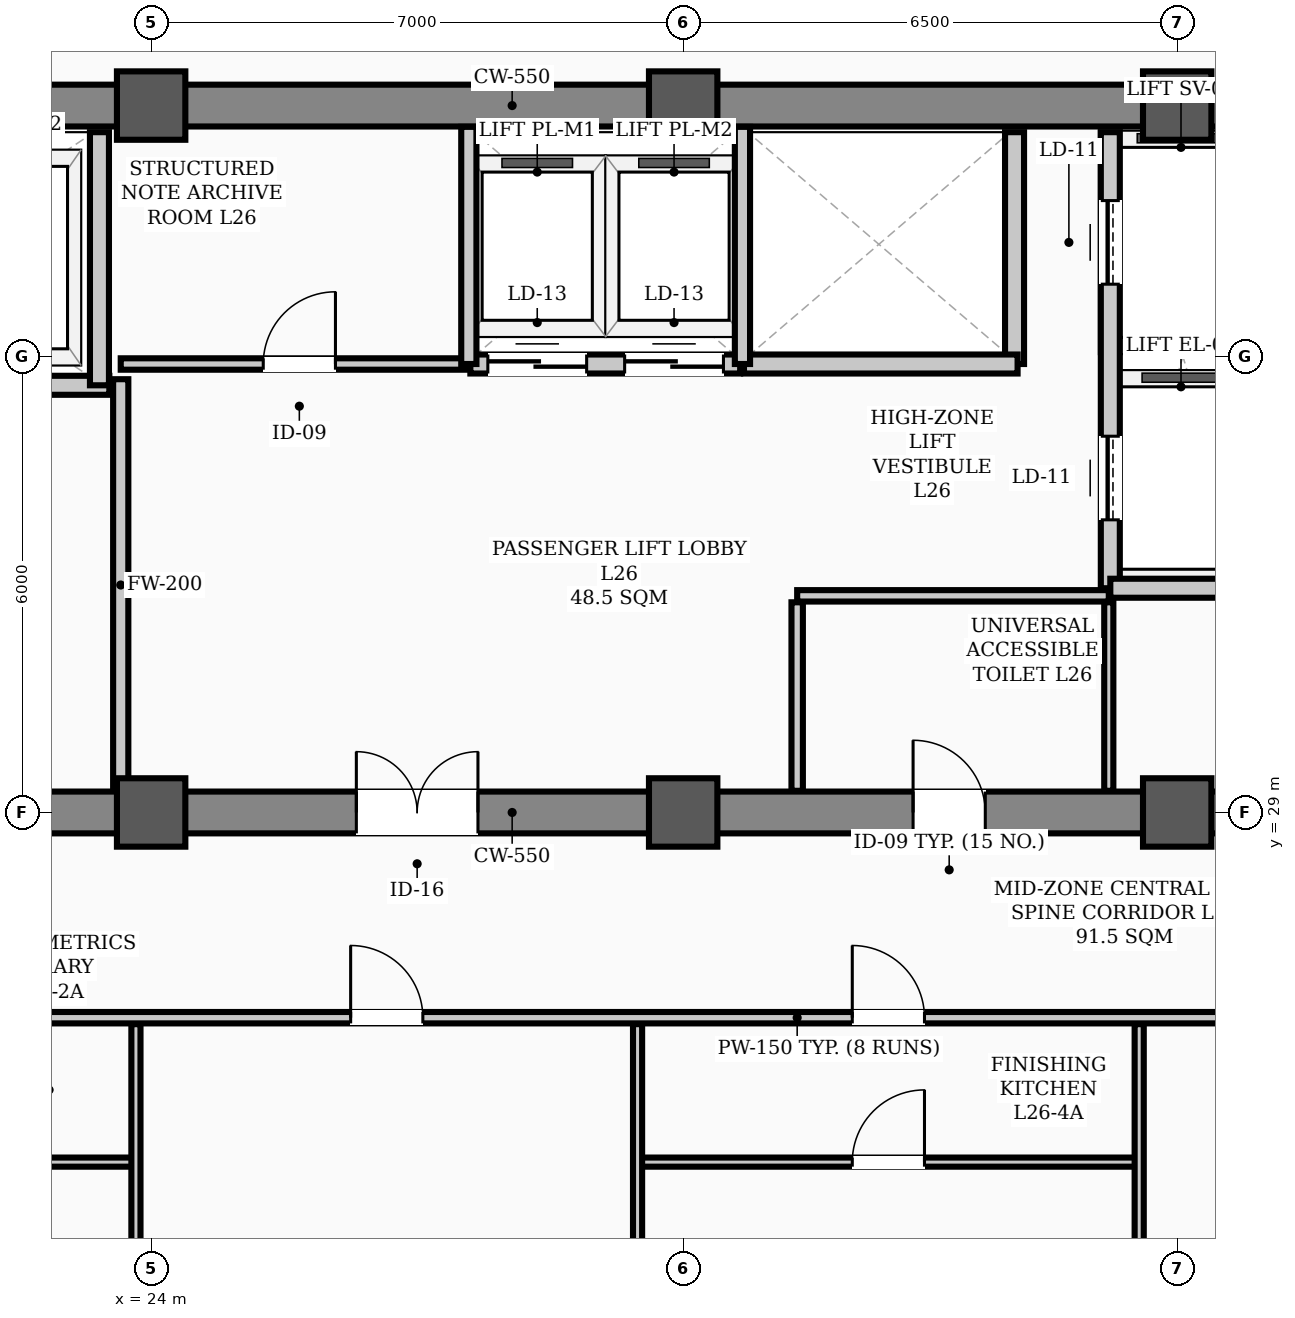
"""IFC4 building model, lengths in metres.
Left out: names, types, materials, properties, quantities, classifications, styles, units other than length and angle.
Written with IfcOpenShell. Run it as: python <this file> out.ifc"""

import sys

from ifc_helpers import new_model, si_unit, direction, frame, frame_2d, origin, origin_2d, place, context, subcontext, project, spatial, rectangle, hollow_rectangle, extrude, element, fill, save


model = new_model("IFC4")
c1 = context("Model", 3, precision=1e-05, world=origin(), true_north=direction((0.0, 1.0)))
c2 = subcontext(c1, "Body", "Model", "MODEL_VIEW")
j1 = project(units=[si_unit("LENGTHUNIT", "METRE"), si_unit("PLANEANGLEUNIT", "RADIAN")], contexts=[c1])
p1 = place(None, origin())
s1 = spatial("IfcSite", under=j1, at=p1, CompositionType="ELEMENT")
p2 = place(p1, origin())
s2 = spatial("IfcBuilding", under=s1, at=p2, CompositionType="ELEMENT")
p3 = place(p2, frame((0.0, 0.0, 106.0)))
s3 = spatial("IfcBuildingStorey", under=s2, at=p3, CompositionType="ELEMENT", Elevation=106.0)
for number, where, z_axis, x_axis in (
    (1, (24.0, 29.0, 0.0), (0.0, 0.0, 1.0), (1.0, 0.0, 0.0)),
    (2, (24.0, 38.3, 0.0), (0.0, 0.0, 1.0), (1.0, 0.0, 0.0)),
    (3, (31.0, 29.0, 0.0), (0.0, 0.0, 1.0), (1.0, 0.0, 0.0)),
    (4, (31.0, 38.3, 0.0), (0.0, 0.0, 1.0), (1.0, 0.0, 0.0)),
    (5, (37.5, 29.0, 0.0), (0.0, 0.0, 1.0), (1.0, 0.0, 0.0)),
    (6, (37.5, 38.3, 0.0), (0.0, 0.0, 1.0), (1.0, 0.0, 0.0)),
):
    element("IfcColumn", number, at=place(p3, frame(where, z_axis=z_axis, x_axis=x_axis)), inside=s3, PredefinedType="COLUMN", context=c2, shape_type="SweptSolid", body=[
        extrude(hollow_rectangle(XDim=0.9, YDim=0.9, WallThickness=0.035, InnerFilletRadius=0.017, OuterFilletRadius=0.052, at=origin_2d()), origin(), (0.0, 0.0, 1.0), 5.0),
    ])
p4 = place(p3, frame((13.5, 29.0, 0.0), z_axis=(0.0, 0.0, 1.0), x_axis=(1.0, 0.0, 0.0)))
e7 = element("IfcWall", 7, at=p4, inside=s3, PredefinedType="SHEAR", context=c2, shape_type="SweptSolid", body=[
    extrude(rectangle(XDim=30.5, YDim=0.55, at=frame_2d((15.25, 0.0))), origin(), (0.0, 0.0, 1.0), 4.82),
])
p5 = place(p4, frame((1.75, 0.0, 0.0)))
e8 = element("IfcOpeningElement", 8, at=p5, cuts=e7, PredefinedType="OPENING", context=c2, shape_type="SweptSolid", body=[
    extrude(rectangle(XDim=1.1, YDim=2.08, at=frame_2d((0.55, 1.04))), frame((0.0, 0.285, 0.0), z_axis=(0.0, -1.0, 0.0), x_axis=(1.0, 0.0, 0.0)), (0.0, 0.0, 1.0), 0.57),
])
p6 = place(p4, frame((26.7, 0.0, 0.0)))
e9 = element("IfcOpeningElement", 9, at=p6, cuts=e7, PredefinedType="OPENING", context=c2, shape_type="SweptSolid", body=[
    extrude(rectangle(XDim=1.1, YDim=2.08, at=frame_2d((0.55, 1.04))), frame((0.0, 0.285, 0.0), z_axis=(0.0, -1.0, 0.0), x_axis=(1.0, 0.0, 0.0)), (0.0, 0.0, 1.0), 0.57),
])
p7 = place(p4, frame((6.8, 0.0, 0.0)))
e10 = element("IfcOpeningElement", 10, at=p7, cuts=e7, PredefinedType="OPENING", context=c2, shape_type="SweptSolid", body=[
    extrude(rectangle(XDim=1.1, YDim=2.08, at=frame_2d((0.55, 1.04))), frame((0.0, 0.285, 0.0), z_axis=(0.0, -1.0, 0.0), x_axis=(1.0, 0.0, 0.0)), (0.0, 0.0, 1.0), 0.57),
])
p8 = place(p4, frame((13.2, 0.0, 0.0)))
e11 = element("IfcOpeningElement", 11, at=p8, cuts=e7, PredefinedType="OPENING", context=c2, shape_type="SweptSolid", body=[
    extrude(rectangle(XDim=1.6, YDim=2.08, at=frame_2d((0.8, 1.04))), frame((0.0, 0.285, 0.0), z_axis=(0.0, -1.0, 0.0), x_axis=(1.0, 0.0, 0.0)), (0.0, 0.0, 1.0), 0.57),
])
p9 = place(p4, frame((20.525, 0.0, 0.0)))
e12 = element("IfcOpeningElement", 12, at=p9, cuts=e7, PredefinedType="OPENING", context=c2, shape_type="SweptSolid", body=[
    extrude(rectangle(XDim=0.95, YDim=2.08, at=frame_2d((0.475, 1.04))), frame((0.0, 0.285, 0.0), z_axis=(0.0, -1.0, 0.0), x_axis=(1.0, 0.0, 0.0)), (0.0, 0.0, 1.0), 0.57),
])
p10 = place(p3, frame((13.5, 38.3, 0.0), z_axis=(0.0, 0.0, 1.0), x_axis=(1.0, 0.0, 0.0)))
e13 = element("IfcWall", 13, at=p10, inside=s3, PredefinedType="SHEAR", context=c2, shape_type="SweptSolid", body=[
    extrude(rectangle(XDim=30.5, YDim=0.55, at=frame_2d((15.25, 0.0))), origin(), (0.0, 0.0, 1.0), 4.82),
])
p11 = place(p3, frame((18.1, 34.62, 0.0), z_axis=(0.0, 0.0, 1.0), x_axis=(1.0, 0.0, 0.0)))
e14 = element("IfcWall", 14, at=p11, inside=s3, PredefinedType="STANDARD", context=c2, shape_type="SweptSolid", body=[
    extrude(rectangle(XDim=5.35, YDim=0.25, at=frame_2d((2.675, 0.0))), origin(), (0.0, 0.0, 1.0), 4.82),
])
p12 = place(p11, frame((0.85, 0.0, 0.0)))
e15 = element("IfcOpeningElement", 15, at=p12, cuts=e14, PredefinedType="OPENING", context=c2, shape_type="SweptSolid", body=[
    extrude(rectangle(XDim=1.1, YDim=2.08, at=frame_2d((0.55, 1.04))), frame((0.0, 0.135, 0.0), z_axis=(0.0, -1.0, 0.0), x_axis=(1.0, 0.0, 0.0)), (0.0, 0.0, 1.0), 0.27),
])
p13 = place(p11, frame((3.45, 0.0, 0.0)))
e16 = element("IfcOpeningElement", 16, at=p13, cuts=e14, PredefinedType="OPENING", context=c2, shape_type="SweptSolid", body=[
    extrude(rectangle(XDim=1.1, YDim=2.08, at=frame_2d((0.55, 1.04))), frame((0.0, 0.135, 0.0), z_axis=(0.0, -1.0, 0.0), x_axis=(1.0, 0.0, 0.0)), (0.0, 0.0, 1.0), 0.27),
])
p14 = place(p3, frame((36.62, 31.95, 0.0), z_axis=(0.0, 0.0, 1.0), x_axis=(0.0, 1.0, 0.0)))
e17 = element("IfcWall", 17, at=p14, inside=s3, PredefinedType="STANDARD", context=c2, shape_type="SweptSolid", body=[
    extrude(rectangle(XDim=6.0, YDim=0.25, at=frame_2d((3.0, 0.0))), origin(), (0.0, 0.0, 1.0), 4.4),
])
p15 = place(p14, frame((0.9, 0.0, 0.0)))
e18 = element("IfcOpeningElement", 18, at=p15, cuts=e17, PredefinedType="OPENING", context=c2, shape_type="SweptSolid", body=[
    extrude(rectangle(XDim=1.1, YDim=2.08, at=frame_2d((0.55, 1.04))), frame((0.0, 0.135, 0.0), z_axis=(0.0, -1.0, 0.0), x_axis=(1.0, 0.0, 0.0)), (0.0, 0.0, 1.0), 0.27),
])
p16 = place(p14, frame((4.0, 0.0, 0.0)))
e19 = element("IfcOpeningElement", 19, at=p16, cuts=e17, PredefinedType="OPENING", context=c2, shape_type="SweptSolid", body=[
    extrude(rectangle(XDim=1.1, YDim=2.08, at=frame_2d((0.55, 1.04))), frame((0.0, 0.135, 0.0), z_axis=(0.0, -1.0, 0.0), x_axis=(1.0, 0.0, 0.0)), (0.0, 0.0, 1.0), 0.27),
])
p17 = place(p3, frame((36.62, 31.95, 0.0), z_axis=(0.0, 0.0, 1.0), x_axis=(1.0, 0.0, 0.0)))
e20 = element("IfcWall", 20, at=p17, inside=s3, PredefinedType="STANDARD", context=c2, shape_type="SweptSolid", body=[
    extrude(rectangle(XDim=1.9, YDim=0.25, at=frame_2d((0.95, 0.0))), origin(), (0.0, 0.0, 1.0), 4.58),
])
p18 = place(p3, frame((23.32, 34.62, 0.0), z_axis=(0.0, 0.0, 1.0), x_axis=(0.0, 1.0, 0.0)))
e21 = element("IfcWall", 21, at=p18, inside=s3, PredefinedType="STANDARD", context=c2, shape_type="SweptSolid", body=[
    extrude(rectangle(XDim=3.33, YDim=0.25, at=frame_2d((1.665, 0.0))), origin(), (0.0, 0.0, 1.0), 4.4),
])
p19 = place(p3, frame((35.36, 34.9, 0.0), z_axis=(0.0, 0.0, 1.0), x_axis=(0.0, 1.0, 0.0)))
e22 = element("IfcWall", 22, at=p19, inside=s3, PredefinedType="STANDARD", context=c2, shape_type="SweptSolid", body=[
    extrude(rectangle(XDim=3.05, YDim=0.25, at=frame_2d((1.525, 0.0))), origin(), (0.0, 0.0, 1.0), 4.4),
])
p20 = place(p3, frame((28.2, 34.9, 0.0), z_axis=(0.0, 0.0, 1.0), x_axis=(1.0, 0.0, 0.0)))
e23 = element("IfcWall", 23, at=p20, inside=s3, PredefinedType="STANDARD", context=c2, shape_type="SweptSolid", body=[
    extrude(rectangle(XDim=3.55, YDim=0.25, at=frame_2d((1.775, 0.0))), origin(), (0.0, 0.0, 1.0), 4.82),
])
p21 = place(p20, frame((0.23, 0.0, 0.0)))
e24 = element("IfcOpeningElement", 24, at=p21, cuts=e23, PredefinedType="OPENING", context=c2, shape_type="SweptSolid", body=[
    extrude(rectangle(XDim=1.3, YDim=2.08, at=frame_2d((0.65, 1.04))), frame((0.0, 0.135, 0.0), z_axis=(0.0, -1.0, 0.0), x_axis=(1.0, 0.0, 0.0)), (0.0, 0.0, 1.0), 0.27),
])
p22 = place(p20, frame((2.03, 0.0, 0.0)))
e25 = element("IfcOpeningElement", 25, at=p22, cuts=e23, PredefinedType="OPENING", context=c2, shape_type="SweptSolid", body=[
    extrude(rectangle(XDim=1.3, YDim=2.08, at=frame_2d((0.65, 1.04))), frame((0.0, 0.135, 0.0), z_axis=(0.0, -1.0, 0.0), x_axis=(1.0, 0.0, 0.0)), (0.0, 0.0, 1.0), 0.27),
])
p23 = place(p3, frame((31.8, 34.9, 0.0), z_axis=(0.0, 0.0, 1.0), x_axis=(1.0, 0.0, 0.0)))
e26 = element("IfcWall", 26, at=p23, inside=s3, PredefinedType="STANDARD", context=c2, shape_type="SweptSolid", body=[
    extrude(rectangle(XDim=3.6, YDim=0.25, at=frame_2d((1.8, 0.0))), origin(), (0.0, 0.0, 1.0), 4.82),
])
p24 = place(p3, frame((23.6, 34.9, 0.0), z_axis=(0.0, 0.0, 1.0), x_axis=(1.0, 0.0, 0.0)))
e27 = element("IfcWall", 27, at=p24, inside=s3, PredefinedType="PARTITIONING", context=c2, shape_type="SweptSolid", body=[
    extrude(rectangle(XDim=4.58, YDim=0.15, at=frame_2d((2.29, 0.0))), origin(), (0.0, 0.0, 1.0), 4.82),
])
p25 = place(p24, frame((1.875, 0.0, 0.0)))
e28 = element("IfcOpeningElement", 28, at=p25, cuts=e27, PredefinedType="OPENING", context=c2, shape_type="SweptSolid", body=[
    extrude(rectangle(XDim=0.95, YDim=2.08, at=frame_2d((0.475, 1.04))), frame((0.0, 0.085, 0.0), z_axis=(0.0, -1.0, 0.0), x_axis=(1.0, 0.0, 0.0)), (0.0, 0.0, 1.0), 0.17),
])
p26 = place(p3, frame((32.5, 31.85, 0.0), z_axis=(0.0, 0.0, 1.0), x_axis=(1.0, 0.0, 0.0)))
e29 = element("IfcWall", 29, at=p26, inside=s3, PredefinedType="PARTITIONING", context=c2, shape_type="SweptSolid", body=[
    extrude(rectangle(XDim=4.1, YDim=0.15, at=frame_2d((2.05, 0.0))), origin(), (0.0, 0.0, 1.0), 4.82),
])
p27 = place(p3, frame((7.81, 26.3, 0.0), z_axis=(0.0, 0.0, 1.0), x_axis=(1.0, 0.0, 0.0)))
e30 = element("IfcWall", 30, at=p27, inside=s3, PredefinedType="PARTITIONING", context=c2, shape_type="SweptSolid", body=[
    extrude(rectangle(XDim=49.38, YDim=0.15, at=frame_2d((24.69, 0.0))), origin(), (0.0, 0.0, 1.0), 4.2),
])
p28 = place(p27, frame((6.89, 0.0, 0.0)))
e31 = element("IfcOpeningElement", 31, at=p28, cuts=e30, PredefinedType="OPENING", context=c2, shape_type="SweptSolid", body=[
    extrude(rectangle(XDim=0.95, YDim=2.08, at=frame_2d((0.475, 1.04))), frame((0.0, 0.085, 0.0), z_axis=(0.0, -1.0, 0.0), x_axis=(1.0, 0.0, 0.0)), (0.0, 0.0, 1.0), 0.17),
])
p29 = place(p27, frame((12.315, 0.0, 0.0)))
e32 = element("IfcOpeningElement", 32, at=p29, cuts=e30, PredefinedType="OPENING", context=c2, shape_type="SweptSolid", body=[
    extrude(rectangle(XDim=0.95, YDim=2.08, at=frame_2d((0.475, 1.04))), frame((0.0, 0.085, 0.0), z_axis=(0.0, -1.0, 0.0), x_axis=(1.0, 0.0, 0.0)), (0.0, 0.0, 1.0), 0.17),
])
p30 = place(p27, frame((18.815, 0.0, 0.0)))
e33 = element("IfcOpeningElement", 33, at=p30, cuts=e30, PredefinedType="OPENING", context=c2, shape_type="SweptSolid", body=[
    extrude(rectangle(XDim=0.95, YDim=2.08, at=frame_2d((0.475, 1.04))), frame((0.0, 0.085, 0.0), z_axis=(0.0, -1.0, 0.0), x_axis=(1.0, 0.0, 0.0)), (0.0, 0.0, 1.0), 0.17),
])
p31 = place(p27, frame((25.415, 0.0, 0.0)))
e34 = element("IfcOpeningElement", 34, at=p31, cuts=e30, PredefinedType="OPENING", context=c2, shape_type="SweptSolid", body=[
    extrude(rectangle(XDim=0.95, YDim=2.08, at=frame_2d((0.475, 1.04))), frame((0.0, 0.085, 0.0), z_axis=(0.0, -1.0, 0.0), x_axis=(1.0, 0.0, 0.0)), (0.0, 0.0, 1.0), 0.17),
])
p32 = place(p27, frame((31.915, 0.0, 0.0)))
e35 = element("IfcOpeningElement", 35, at=p32, cuts=e30, PredefinedType="OPENING", context=c2, shape_type="SweptSolid", body=[
    extrude(rectangle(XDim=0.95, YDim=2.08, at=frame_2d((0.475, 1.04))), frame((0.0, 0.085, 0.0), z_axis=(0.0, -1.0, 0.0), x_axis=(1.0, 0.0, 0.0)), (0.0, 0.0, 1.0), 0.17),
])
p33 = place(p27, frame((36.59, 0.0, 0.0)))
e36 = element("IfcOpeningElement", 36, at=p33, cuts=e30, PredefinedType="OPENING", context=c2, shape_type="SweptSolid", body=[
    extrude(rectangle(XDim=0.95, YDim=2.08, at=frame_2d((0.475, 1.04))), frame((0.0, 0.085, 0.0), z_axis=(0.0, -1.0, 0.0), x_axis=(1.0, 0.0, 0.0)), (0.0, 0.0, 1.0), 0.17),
])
p34 = place(p3, frame((17.4, 24.4, 0.0), z_axis=(0.0, 0.0, 1.0), x_axis=(1.0, 0.0, 0.0)))
e37 = element("IfcWall", 37, at=p34, inside=s3, PredefinedType="PARTITIONING", context=c2, shape_type="SweptSolid", body=[
    extrude(rectangle(XDim=6.4, YDim=0.12, at=frame_2d((3.2, 0.0))), origin(), (0.0, 0.0, 1.0), 4.2),
])
p35 = place(p34, frame((2.725, 0.0, 0.0)))
e38 = element("IfcOpeningElement", 38, at=p35, cuts=e37, PredefinedType="OPENING", context=c2, shape_type="SweptSolid", body=[
    extrude(rectangle(XDim=0.95, YDim=2.08, at=frame_2d((0.475, 1.04))), frame((0.0, 0.07, 0.0), z_axis=(0.0, -1.0, 0.0), x_axis=(1.0, 0.0, 0.0)), (0.0, 0.0, 1.0), 0.14),
])
p36 = place(p3, frame((30.4, 24.4, 0.0), z_axis=(0.0, 0.0, 1.0), x_axis=(1.0, 0.0, 0.0)))
e39 = element("IfcWall", 39, at=p36, inside=s3, PredefinedType="PARTITIONING", context=c2, shape_type="SweptSolid", body=[
    extrude(rectangle(XDim=6.6, YDim=0.12, at=frame_2d((3.3, 0.0))), origin(), (0.0, 0.0, 1.0), 4.2),
])
p37 = place(p36, frame((2.825, 0.0, 0.0)))
e40 = element("IfcOpeningElement", 40, at=p37, cuts=e39, PredefinedType="OPENING", context=c2, shape_type="SweptSolid", body=[
    extrude(rectangle(XDim=0.95, YDim=2.08, at=frame_2d((0.475, 1.04))), frame((0.0, 0.07, 0.0), z_axis=(0.0, -1.0, 0.0), x_axis=(1.0, 0.0, 0.0)), (0.0, 0.0, 1.0), 0.14),
])
p38 = place(p3, frame((23.6, 29.285, 0.0), z_axis=(0.0, 0.0, 1.0), x_axis=(0.0, 1.0, 0.0)))
e41 = element("IfcWall", 41, at=p38, inside=s3, PredefinedType="STANDARD", context=c2, shape_type="SweptSolid", body=[
    extrude(rectangle(XDim=5.415, YDim=0.2, at=frame_2d((2.708, 0.0))), origin(), (0.0, 0.0, 1.0), 4.2),
])
p39 = place(p3, frame((32.5, 29.285, 0.0), z_axis=(0.0, 0.0, 1.0), x_axis=(0.0, 1.0, 0.0)))
e42 = element("IfcWall", 42, at=p39, inside=s3, PredefinedType="PARTITIONING", context=c2, shape_type="SweptSolid", body=[
    extrude(rectangle(XDim=2.48, YDim=0.15, at=frame_2d((1.24, 0.0))), origin(), (0.0, 0.0, 1.0), 4.4),
])
p40 = place(p3, frame((36.6, 29.285, 0.0), z_axis=(0.0, 0.0, 1.0), x_axis=(0.0, 1.0, 0.0)))
e43 = element("IfcWall", 43, at=p40, inside=s3, PredefinedType="PARTITIONING", context=c2, shape_type="SweptSolid", body=[
    extrude(rectangle(XDim=2.48, YDim=0.12, at=frame_2d((1.24, 0.0))), origin(), (0.0, 0.0, 1.0), 4.4),
])
p41 = place(p3, frame((23.8, 11.57, 0.0), z_axis=(0.0, 0.0, 1.0), x_axis=(0.0, 1.0, 0.0)))
e44 = element("IfcWall", 44, at=p41, inside=s3, PredefinedType="PARTITIONING", context=c2, shape_type="SweptSolid", body=[
    extrude(rectangle(XDim=14.645, YDim=0.12, at=frame_2d((7.323, 0.0))), origin(), (0.0, 0.0, 1.0), 4.1),
])
for number, where, z_axis, x_axis in (
    (45, (30.4, 9.81, 0.0), (0.0, 0.0, 1.0), (0.0, 1.0, 0.0)),
    (46, (37.0, 9.81, 0.0), (0.0, 0.0, 1.0), (0.0, 1.0, 0.0)),
):
    element("IfcWall", number, at=place(p3, frame(where, z_axis=z_axis, x_axis=x_axis)), inside=s3, PredefinedType="PARTITIONING", context=c2, shape_type="SweptSolid", body=[
        extrude(rectangle(XDim=16.405, YDim=0.12, at=frame_2d((8.203, 0.0))), origin(), (0.0, 0.0, 1.0), 4.1),
    ])
for number, where, z_axis, x_axis in (
    (47, (28.18, 34.9, 0.0), (0.0, 0.0, 1.0), (0.0, 1.0, 0.0)),
    (48, (31.78, 34.9, 0.0), (0.0, 0.0, 1.0), (0.0, 1.0, 0.0)),
):
    element("IfcWall", number, at=place(p3, frame(where, z_axis=z_axis, x_axis=x_axis)), inside=s3, PredefinedType="STANDARD", context=c2, shape_type="SweptSolid", body=[
        extrude(rectangle(XDim=3.12, YDim=0.2, at=frame_2d((1.56, 0.0))), origin(), (0.0, 0.0, 1.0), 4.4),
    ])
p42 = place(p8, origin())
e49 = element("IfcDoor", 49, at=p42, inside=s3, OperationType="DOUBLE_DOOR_SINGLE_SWING", PredefinedType="DOOR", context=c2, shape_type="SweptSolid", body=[
    extrude(rectangle(XDim=1.6, YDim=2.08, at=frame_2d((0.8, 1.04))), frame((0.0, 0.025, 0.0), z_axis=(0.0, -1.0, 0.0), x_axis=(1.0, 0.0, 0.0)), (0.0, 0.0, 1.0), 0.05),
])
fill(e11, e49)
p43 = place(p25, origin())
e50 = element("IfcDoor", 50, at=p43, inside=s3, OperationType="SINGLE_SWING_RIGHT", PredefinedType="DOOR", context=c2, shape_type="SweptSolid", body=[
    extrude(rectangle(XDim=0.95, YDim=2.08, at=frame_2d((0.475, 1.04))), frame((0.0, 0.025, 0.0), z_axis=(0.0, -1.0, 0.0), x_axis=(1.0, 0.0, 0.0)), (0.0, 0.0, 1.0), 0.05),
])
fill(e28, e50)
p44 = place(p9, origin())
e51 = element("IfcDoor", 51, at=p44, inside=s3, OperationType="SINGLE_SWING_LEFT", PredefinedType="DOOR", context=c2, shape_type="SweptSolid", body=[
    extrude(rectangle(XDim=0.95, YDim=2.08, at=frame_2d((0.475, 1.04))), frame((0.0, 0.025, 0.0), z_axis=(0.0, -1.0, 0.0), x_axis=(1.0, 0.0, 0.0)), (0.0, 0.0, 1.0), 0.05),
])
fill(e12, e51)
p45 = place(p30, origin())
e52 = element("IfcDoor", 52, at=p45, inside=s3, OperationType="SINGLE_SWING_LEFT", PredefinedType="DOOR", context=c2, shape_type="SweptSolid", body=[
    extrude(rectangle(XDim=0.95, YDim=2.08, at=frame_2d((0.475, 1.04))), frame((0.0, 0.025, 0.0), z_axis=(0.0, -1.0, 0.0), x_axis=(1.0, 0.0, 0.0)), (0.0, 0.0, 1.0), 0.05),
])
fill(e33, e52)
p46 = place(p37, origin())
e53 = element("IfcDoor", 53, at=p46, inside=s3, OperationType="SINGLE_SWING_RIGHT", PredefinedType="DOOR", context=c2, shape_type="SweptSolid", body=[
    extrude(rectangle(XDim=0.95, YDim=2.08, at=frame_2d((0.475, 1.04))), frame((0.0, 0.025, 0.0), z_axis=(0.0, -1.0, 0.0), x_axis=(1.0, 0.0, 0.0)), (0.0, 0.0, 1.0), 0.05),
])
fill(e40, e53)
p47 = place(p31, origin())
e54 = element("IfcDoor", 54, at=p47, inside=s3, OperationType="SINGLE_SWING_LEFT", PredefinedType="DOOR", context=c2, shape_type="SweptSolid", body=[
    extrude(rectangle(XDim=0.95, YDim=2.08, at=frame_2d((0.475, 1.04))), frame((0.0, 0.025, 0.0), z_axis=(0.0, -1.0, 0.0), x_axis=(1.0, 0.0, 0.0)), (0.0, 0.0, 1.0), 0.05),
])
fill(e34, e54)
p48 = place(p15, origin())
e55 = element("IfcDoor", 55, at=p48, inside=s3, OperationType="SLIDING_TO_LEFT", PredefinedType="DOOR", context=c2, shape_type="SweptSolid", body=[
    extrude(rectangle(XDim=1.1, YDim=2.08, at=frame_2d((0.55, 1.04))), frame((0.0, 0.025, 0.0), z_axis=(0.0, -1.0, 0.0), x_axis=(1.0, 0.0, 0.0)), (0.0, 0.0, 1.0), 0.05),
])
fill(e18, e55)
p49 = place(p16, origin())
e56 = element("IfcDoor", 56, at=p49, inside=s3, OperationType="SLIDING_TO_LEFT", PredefinedType="DOOR", context=c2, shape_type="SweptSolid", body=[
    extrude(rectangle(XDim=1.1, YDim=2.08, at=frame_2d((0.55, 1.04))), frame((0.0, 0.025, 0.0), z_axis=(0.0, -1.0, 0.0), x_axis=(1.0, 0.0, 0.0)), (0.0, 0.0, 1.0), 0.05),
])
fill(e19, e56)
p50 = place(p21, origin())
e57 = element("IfcDoor", 57, at=p50, inside=s3, OperationType="DOUBLE_DOOR_SLIDING", PredefinedType="DOOR", context=c2, shape_type="SweptSolid", body=[
    extrude(rectangle(XDim=1.3, YDim=2.08, at=frame_2d((0.65, 1.04))), frame((0.0, 0.025, 0.0), z_axis=(0.0, -1.0, 0.0), x_axis=(1.0, 0.0, 0.0)), (0.0, 0.0, 1.0), 0.05),
])
fill(e24, e57)
p51 = place(p22, origin())
e58 = element("IfcDoor", 58, at=p51, inside=s3, OperationType="DOUBLE_DOOR_SLIDING", PredefinedType="DOOR", context=c2, shape_type="SweptSolid", body=[
    extrude(rectangle(XDim=1.3, YDim=2.08, at=frame_2d((0.65, 1.04))), frame((0.0, 0.025, 0.0), z_axis=(0.0, -1.0, 0.0), x_axis=(1.0, 0.0, 0.0)), (0.0, 0.0, 1.0), 0.05),
])
fill(e25, e58)
save(model, sys.argv[1])
